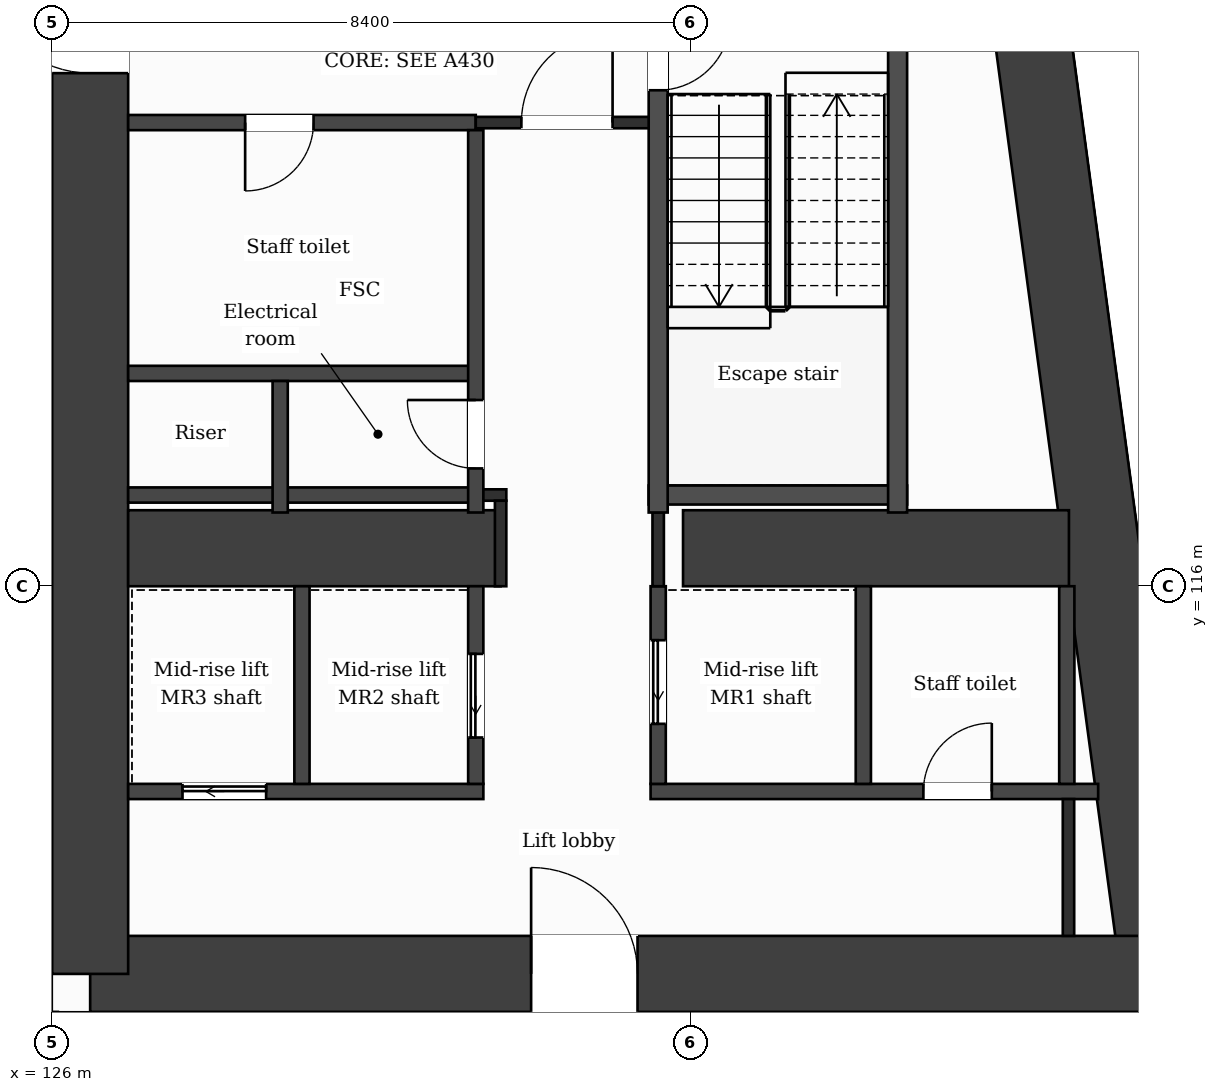
"""IFC4 building model, lengths in metres.
Left out: names, types, materials, properties, quantities, classifications, styles, units other than length and angle.
Written with IfcOpenShell. Run it as: python <this file> out.ifc"""

import sys

from ifc_helpers import new_model, si_unit, direction, frame, frame_2d, origin, place, context, subcontext, project, spatial, rectangle, extrude, element, fill, save


model = new_model("IFC4")
c1 = context("Model", 3, precision=1e-05, world=origin(), true_north=direction((0.0, 1.0)))
c2 = subcontext(c1, "Body", "Model", "MODEL_VIEW")
j1 = project(units=[si_unit("LENGTHUNIT", "METRE"), si_unit("PLANEANGLEUNIT", "RADIAN")], contexts=[c1])
p1 = place(None, origin())
s1 = spatial("IfcSite", under=j1, at=p1, CompositionType="ELEMENT")
p2 = place(p1, origin())
s2 = spatial("IfcBuilding", under=s1, at=p2, CompositionType="ELEMENT")
p3 = place(p2, frame((0.0, 0.0, 124.3)))
s3 = spatial("IfcBuildingStorey", under=s2, at=p3, CompositionType="ELEMENT", Elevation=124.3)
p4 = place(p3, frame((137.732, 131.9, 0.0), z_axis=(0.0, 0.0, 1.0), x_axis=(0.133411141623, -0.991060778808, 0.0)))
e1 = element("IfcWall", 1, at=p4, inside=s3, PredefinedType="SHEAR", context=c2, shape_type="SweptSolid", body=[
    extrude(rectangle(XDim=21.189, YDim=1.0, at=frame_2d((10.595, 0.0))), origin(), (0.0, 0.0, 1.0), 3.7),
])
p5 = place(p3, frame((140.559, 110.9, 0.0), z_axis=(0.0, 0.0, 1.0), x_axis=(-1.0, 0.0, 0.0)))
e2 = element("IfcWall", 2, at=p5, inside=s3, PredefinedType="SHEAR", context=c2, shape_type="SweptSolid", body=[
    extrude(rectangle(XDim=14.059, YDim=1.0, at=frame_2d((7.029, 0.0))), origin(), (0.0, 0.0, 1.0), 3.7),
])
p6 = place(p5, frame((6.858, 0.0, 0.0)))
e3 = element("IfcOpeningElement", 3, at=p6, cuts=e2, PredefinedType="OPENING", context=c2, shape_type="SweptSolid", body=[
    extrude(rectangle(XDim=1.4, YDim=2.1, at=frame_2d((0.7, 1.05))), frame((0.0, 0.51, 0.0), z_axis=(0.0, -1.0, 0.0), x_axis=(1.0, 0.0, 0.0)), (0.0, 0.0, 1.0), 1.02),
])
p7 = place(p3, frame((126.5, 110.9, 0.0), z_axis=(0.0, 0.0, 1.0), x_axis=(0.0, 1.0, 0.0)))
e4 = element("IfcWall", 4, at=p7, inside=s3, PredefinedType="SHEAR", context=c2, shape_type="SweptSolid", body=[
    extrude(rectangle(XDim=21.0, YDim=1.0, at=frame_2d((10.5, 0.0))), origin(), (0.0, 0.0, 1.0), 3.7),
])
p8 = place(p7, frame((11.85, 0.0, 0.0)))
e5 = element("IfcOpeningElement", 5, at=p8, cuts=e4, PredefinedType="OPENING", context=c2, shape_type="SweptSolid", body=[
    extrude(rectangle(XDim=1.4, YDim=2.1, at=frame_2d((0.7, 1.05))), frame((0.0, 0.51, 0.0), z_axis=(0.0, -1.0, 0.0), x_axis=(1.0, 0.0, 0.0)), (0.0, 0.0, 1.0), 1.02),
])
p9 = place(p3, frame((127.0, 116.5, 0.0), z_axis=(0.0, 0.0, 1.0), x_axis=(1.0, 0.0, 0.0)))
e6 = element("IfcWall", 6, at=p9, inside=s3, PredefinedType="SHEAR", context=c2, shape_type="SweptSolid", body=[
    extrude(rectangle(XDim=4.9, YDim=1.0, at=frame_2d((2.45, 0.0))), origin(), (0.0, 0.0, 1.0), 3.7),
])
p10 = place(p3, frame((134.3, 116.5, 0.0), z_axis=(0.0, 0.0, 1.0), x_axis=(1.0, 0.0, 0.0)))
e7 = element("IfcWall", 7, at=p10, inside=s3, PredefinedType="SHEAR", context=c2, shape_type="SweptSolid", body=[
    extrude(rectangle(XDim=5.077, YDim=1.0, at=frame_2d((2.539, 0.0))), origin(), (0.0, 0.0, 1.0), 3.7),
])
p11 = place(p3, frame((140.348, 103.85, 0.0), z_axis=(0.0, 0.0, 1.0), x_axis=(-0.133431549479, 0.991058031401, 0.0)))
e8 = element("IfcWall", 8, at=p11, inside=s3, PredefinedType="SOLIDWALL", context=c2, shape_type="SweptSolid", body=[
    extrude(rectangle(XDim=6.609, YDim=0.3, at=frame_2d((3.304, 0.0))), origin(), (0.0, 0.0, 1.0), 3.38),
])
p12 = place(p11, frame((0.737, 0.0, 0.9)))
e9 = element("IfcOpeningElement", 9, at=p12, cuts=e8, PredefinedType="OPENING", context=c2, shape_type="SweptSolid", body=[
    extrude(rectangle(XDim=1.2, YDim=2.1, at=frame_2d((0.6, 1.05))), frame((0.0, 0.16, 0.0), z_axis=(0.0, -1.0, 0.0), x_axis=(1.0, 0.0, 0.0)), (0.0, 0.0, 1.0), 0.32),
])
p13 = place(p11, frame((3.991, 0.0, 0.0)))
e10 = element("IfcOpeningElement", 10, at=p13, cuts=e8, PredefinedType="OPENING", context=c2, shape_type="SweptSolid", body=[
    extrude(rectangle(XDim=1.2, YDim=2.4, at=frame_2d((0.6, 1.2))), frame((0.0, 0.16, 0.0), z_axis=(0.0, -1.0, 0.0), x_axis=(1.0, 0.0, 0.0)), (0.0, 0.0, 1.0), 0.32),
])
p14 = place(p3, frame((127.0, 113.3, 0.0), z_axis=(0.0, 0.0, 1.0), x_axis=(1.0, 0.0, 0.0)))
e11 = element("IfcWall", 11, at=p14, inside=s3, PredefinedType="PARTITIONING", context=c2, shape_type="SweptSolid", body=[
    extrude(rectangle(XDim=4.673, YDim=0.2, at=frame_2d((2.336, 0.0))), origin(), (0.0, 0.0, 1.0), 3.38),
])
p15 = place(p14, frame((0.715, 0.0, 0.0)))
e12 = element("IfcOpeningElement", 12, at=p15, cuts=e11, PredefinedType="OPENING", context=c2, shape_type="SweptSolid", body=[
    extrude(rectangle(XDim=1.1, YDim=2.1, at=frame_2d((0.55, 1.05))), frame((0.0, 0.11, 0.0), z_axis=(0.0, -1.0, 0.0), x_axis=(1.0, 0.0, 0.0)), (0.0, 0.0, 1.0), 0.22),
])
p16 = place(p3, frame((133.873, 113.3, 0.0), z_axis=(0.0, 0.0, 1.0), x_axis=(1.0, 0.0, 0.0)))
e13 = element("IfcWall", 13, at=p16, inside=s3, PredefinedType="PARTITIONING", context=c2, shape_type="SweptSolid", body=[
    extrude(rectangle(XDim=5.888, YDim=0.2, at=frame_2d((2.944, 0.0))), origin(), (0.0, 0.0, 1.0), 3.38),
])
p17 = place(p16, frame((3.589, 0.0, 0.0)))
e14 = element("IfcOpeningElement", 14, at=p17, cuts=e13, PredefinedType="OPENING", context=c2, shape_type="SweptSolid", body=[
    extrude(rectangle(XDim=0.9, YDim=2.1, at=frame_2d((0.45, 1.05))), frame((0.0, 0.11, 0.0), z_axis=(0.0, -1.0, 0.0), x_axis=(1.0, 0.0, 0.0)), (0.0, 0.0, 1.0), 0.22),
])
p18 = place(p3, frame((127.0, 117.2, 0.0), z_axis=(0.0, 0.0, 1.0), x_axis=(1.0, 0.0, 0.0)))
e15 = element("IfcWall", 15, at=p18, inside=s3, PredefinedType="PARTITIONING", context=c2, shape_type="SweptSolid", body=[
    extrude(rectangle(XDim=4.573, YDim=0.2, at=frame_2d((2.287, 0.0))), origin(), (0.0, 0.0, 1.0), 3.38),
])
p19 = place(p3, frame((131.573, 117.2, 0.0), z_axis=(0.0, 0.0, 1.0), x_axis=(1.0, 0.0, 0.0)))
e16 = element("IfcWall", 16, at=p19, inside=s3, PredefinedType="PARTITIONING", context=c2, shape_type="SweptSolid", body=[
    extrude(rectangle(XDim=0.402, YDim=0.15, at=frame_2d((0.201, 0.0))), origin(), (0.0, 0.0, 1.0), 3.38),
])
p20 = place(p3, frame((133.848, 117.2, 0.0), z_axis=(0.0, 0.0, 1.0), x_axis=(1.0, 0.0, 0.0)))
e17 = element("IfcWall", 17, at=p20, inside=s3, PredefinedType="PARTITIONING", context=c2, shape_type="SweptSolid", body=[
    extrude(rectangle(XDim=3.4, YDim=0.25, at=frame_2d((1.7, 0.0))), origin(), (0.0, 0.0, 1.0), 3.38),
])
p21 = place(p3, frame((127.0, 118.8, 0.0), z_axis=(0.0, 0.0, 1.0), x_axis=(1.0, 0.0, 0.0)))
e18 = element("IfcWall", 18, at=p21, inside=s3, PredefinedType="PARTITIONING", context=c2, shape_type="SweptSolid", body=[
    extrude(rectangle(XDim=4.573, YDim=0.2, at=frame_2d((2.287, 0.0))), origin(), (0.0, 0.0, 1.0), 3.38),
])
p22 = place(p3, frame((127.0, 122.1, 0.0), z_axis=(0.0, 0.0, 1.0), x_axis=(1.0, 0.0, 0.0)))
e19 = element("IfcWall", 19, at=p22, inside=s3, PredefinedType="PARTITIONING", context=c2, shape_type="SweptSolid", body=[
    extrude(rectangle(XDim=4.573, YDim=0.2, at=frame_2d((2.287, 0.0))), origin(), (0.0, 0.0, 1.0), 3.38),
])
p23 = place(p22, frame((1.539, 0.0, 0.0)))
e20 = element("IfcOpeningElement", 20, at=p23, cuts=e19, PredefinedType="OPENING", context=c2, shape_type="SweptSolid", body=[
    extrude(rectangle(XDim=0.9, YDim=2.1, at=frame_2d((0.45, 1.05))), frame((0.0, 0.11, 0.0), z_axis=(0.0, -1.0, 0.0), x_axis=(1.0, 0.0, 0.0)), (0.0, 0.0, 1.0), 0.22),
])
p24 = place(p3, frame((131.573, 122.1, 0.0), z_axis=(0.0, 0.0, 1.0), x_axis=(1.0, 0.0, 0.0)))
e21 = element("IfcWall", 21, at=p24, inside=s3, PredefinedType="PARTITIONING", context=c2, shape_type="SweptSolid", body=[
    extrude(rectangle(XDim=2.4, YDim=0.15, at=frame_2d((1.2, 0.0))), origin(), (0.0, 0.0, 1.0), 3.38),
])
p25 = place(p24, frame((0.6, 0.0, 0.0)))
e22 = element("IfcOpeningElement", 22, at=p25, cuts=e21, PredefinedType="OPENING", context=c2, shape_type="SweptSolid", body=[
    extrude(rectangle(XDim=1.2, YDim=2.1, at=frame_2d((0.6, 1.05))), frame((0.0, 0.085, 0.0), z_axis=(0.0, -1.0, 0.0), x_axis=(1.0, 0.0, 0.0)), (0.0, 0.0, 1.0), 0.17),
])
p26 = place(p3, frame((100.8, 122.45, 0.0), z_axis=(0.0, 0.0, 1.0), x_axis=(1.0, 0.0, 0.0)))
e23 = element("IfcWall", 23, at=p26, inside=s3, PredefinedType="PARTITIONING", context=c2, shape_type="SweptSolid", body=[
    extrude(rectangle(XDim=25.2, YDim=0.15, at=frame_2d((12.6, 0.0))), origin(), (0.0, 0.0, 1.0), 3.38),
])
p27 = place(p3, frame((126.0, 109.075, 0.0), z_axis=(0.0, 0.0, 1.0), x_axis=(0.0, 1.0, 0.0)))
e24 = element("IfcWall", 24, at=p27, inside=s3, PredefinedType="PARTITIONING", context=c2, shape_type="SweptSolid", body=[
    extrude(rectangle(XDim=1.325, YDim=0.15, at=frame_2d((0.663, 0.0))), origin(), (0.0, 0.0, 1.0), 3.38),
])
p28 = place(p3, frame((129.0, 116.97, 0.0), z_axis=(0.0, 0.0, 1.0), x_axis=(0.0, 1.0, 0.0)))
e25 = element("IfcWall", 25, at=p28, inside=s3, PredefinedType="PARTITIONING", context=c2, shape_type="SweptSolid", body=[
    extrude(rectangle(XDim=1.73, YDim=0.2, at=frame_2d((0.865, 0.0))), origin(), (0.0, 0.0, 1.0), 3.38),
])
p29 = place(p3, frame((129.287, 113.4, 0.0), z_axis=(0.0, 0.0, 1.0), x_axis=(0.0, 1.0, 0.0)))
e26 = element("IfcWall", 26, at=p29, inside=s3, PredefinedType="PARTITIONING", context=c2, shape_type="SweptSolid", body=[
    extrude(rectangle(XDim=2.6, YDim=0.2, at=frame_2d((1.3, 0.0))), origin(), (0.0, 0.0, 1.0), 3.38),
])
p30 = place(p3, frame((131.573, 113.4, 0.0), z_axis=(0.0, 0.0, 1.0), x_axis=(0.0, 1.0, 0.0)))
e27 = element("IfcWall", 27, at=p30, inside=s3, PredefinedType="PARTITIONING", context=c2, shape_type="SweptSolid", body=[
    extrude(rectangle(XDim=2.6, YDim=0.2, at=frame_2d((1.3, 0.0))), origin(), (0.0, 0.0, 1.0), 3.38),
])
p31 = place(p30, frame((0.61, 0.0, 0.0)))
e28 = element("IfcOpeningElement", 28, at=p31, cuts=e27, PredefinedType="OPENING", context=c2, shape_type="SweptSolid", body=[
    extrude(rectangle(XDim=1.1, YDim=2.1, at=frame_2d((0.55, 1.05))), frame((0.0, 0.11, 0.0), z_axis=(0.0, -1.0, 0.0), x_axis=(1.0, 0.0, 0.0)), (0.0, 0.0, 1.0), 0.22),
])
p32 = place(p3, frame((131.573, 116.97, 0.0), z_axis=(0.0, 0.0, 1.0), x_axis=(0.0, 1.0, 0.0)))
e29 = element("IfcWall", 29, at=p32, inside=s3, PredefinedType="PARTITIONING", context=c2, shape_type="SweptSolid", body=[
    extrude(rectangle(XDim=5.03, YDim=0.2, at=frame_2d((2.515, 0.0))), origin(), (0.0, 0.0, 1.0), 3.38),
])
p33 = place(p32, frame((0.58, 0.0, 0.0)))
e30 = element("IfcOpeningElement", 30, at=p33, cuts=e29, PredefinedType="OPENING", context=c2, shape_type="SweptSolid", body=[
    extrude(rectangle(XDim=0.9, YDim=2.1, at=frame_2d((0.45, 1.05))), frame((0.0, 0.11, 0.0), z_axis=(0.0, -1.0, 0.0), x_axis=(1.0, 0.0, 0.0)), (0.0, 0.0, 1.0), 0.22),
])
p34 = place(p3, frame((131.9, 116.0, 0.0), z_axis=(0.0, 0.0, 1.0), x_axis=(0.0, 1.0, 0.0)))
e31 = element("IfcWall", 31, at=p34, inside=s3, PredefinedType="PARTITIONING", context=c2, shape_type="SweptSolid", body=[
    extrude(rectangle(XDim=1.125, YDim=0.15, at=frame_2d((0.562, 0.0))), origin(), (0.0, 0.0, 1.0), 3.38),
])
p35 = place(p3, frame((133.973, 113.4, 0.0), z_axis=(0.0, 0.0, 1.0), x_axis=(0.0, 1.0, 0.0)))
e32 = element("IfcWall", 32, at=p35, inside=s3, PredefinedType="PARTITIONING", context=c2, shape_type="SweptSolid", body=[
    extrude(rectangle(XDim=2.6, YDim=0.2, at=frame_2d((1.3, 0.0))), origin(), (0.0, 0.0, 1.0), 3.38),
])
p36 = place(p35, frame((0.79, 0.0, 0.0)))
e33 = element("IfcOpeningElement", 33, at=p36, cuts=e32, PredefinedType="OPENING", context=c2, shape_type="SweptSolid", body=[
    extrude(rectangle(XDim=1.1, YDim=2.1, at=frame_2d((0.55, 1.05))), frame((0.0, 0.11, 0.0), z_axis=(0.0, -1.0, 0.0), x_axis=(1.0, 0.0, 0.0)), (0.0, 0.0, 1.0), 0.22),
])
p37 = place(p3, frame((133.973, 116.0, 0.0), z_axis=(0.0, 0.0, 1.0), x_axis=(0.0, 1.0, 0.0)))
e34 = element("IfcWall", 34, at=p37, inside=s3, PredefinedType="PARTITIONING", context=c2, shape_type="SweptSolid", body=[
    extrude(rectangle(XDim=0.97, YDim=0.15, at=frame_2d((0.485, 0.0))), origin(), (0.0, 0.0, 1.0), 3.38),
])
p38 = place(p3, frame((133.973, 116.97, 0.0), z_axis=(0.0, 0.0, 1.0), x_axis=(0.0, 1.0, 0.0)))
e35 = element("IfcWall", 35, at=p38, inside=s3, PredefinedType="PARTITIONING", context=c2, shape_type="SweptSolid", body=[
    extrude(rectangle(XDim=6.855, YDim=0.25, at=frame_2d((3.427, 0.0))), origin(), (0.0, 0.0, 1.0), 3.38),
])
p39 = place(p38, frame((5.555, 0.0, 0.0)))
e36 = element("IfcOpeningElement", 36, at=p39, cuts=e35, PredefinedType="OPENING", context=c2, shape_type="SweptSolid", body=[
    extrude(rectangle(XDim=0.95, YDim=2.1, at=frame_2d((0.475, 1.05))), frame((0.0, 0.135, 0.0), z_axis=(0.0, -1.0, 0.0), x_axis=(1.0, 0.0, 0.0)), (0.0, 0.0, 1.0), 0.27),
])
p40 = place(p3, frame((136.672, 113.4, 0.0), z_axis=(0.0, 0.0, 1.0), x_axis=(0.0, 1.0, 0.0)))
e37 = element("IfcWall", 37, at=p40, inside=s3, PredefinedType="PARTITIONING", context=c2, shape_type="SweptSolid", body=[
    extrude(rectangle(XDim=2.6, YDim=0.2, at=frame_2d((1.3, 0.0))), origin(), (0.0, 0.0, 1.0), 3.38),
])
p41 = place(p3, frame((137.123, 116.97, 0.0), z_axis=(0.0, 0.0, 1.0), x_axis=(0.0, 1.0, 0.0)))
e38 = element("IfcWall", 38, at=p41, inside=s3, PredefinedType="PARTITIONING", context=c2, shape_type="SweptSolid", body=[
    extrude(rectangle(XDim=6.855, YDim=0.25, at=frame_2d((3.427, 0.0))), origin(), (0.0, 0.0, 1.0), 3.38),
])
p42 = place(p3, frame((139.349, 113.4, 0.0), z_axis=(0.0, 0.0, 1.0), x_axis=(0.0, 1.0, 0.0)))
e39 = element("IfcWall", 39, at=p42, inside=s3, PredefinedType="PARTITIONING", context=c2, shape_type="SweptSolid", body=[
    extrude(rectangle(XDim=2.6, YDim=0.2, at=frame_2d((1.3, 0.0))), origin(), (0.0, 0.0, 1.0), 3.38),
])
p43 = place(p3, frame((139.371, 111.4, 0.0), z_axis=(0.0, 0.0, 1.0), x_axis=(0.0, 1.0, 0.0)))
e40 = element("IfcWall", 40, at=p43, inside=s3, PredefinedType="PARTITIONING", context=c2, shape_type="SweptSolid", body=[
    extrude(rectangle(XDim=1.8, YDim=0.15, at=frame_2d((0.9, 0.0))), origin(), (0.0, 0.0, 1.0), 3.38),
])
p44 = place(p25, origin())
e41 = element("IfcDoor", 41, at=p44, inside=s3, OperationType="SINGLE_SWING_RIGHT", PredefinedType="DOOR", context=c2, shape_type="SweptSolid", body=[
    extrude(rectangle(XDim=1.2, YDim=2.1, at=frame_2d((0.6, 1.05))), frame((0.0, 0.025, 0.0), z_axis=(0.0, -1.0, 0.0), x_axis=(1.0, 0.0, 0.0)), (0.0, 0.0, 1.0), 0.05),
])
fill(e22, e41)
p45 = place(p23, origin())
e42 = element("IfcDoor", 42, at=p45, inside=s3, OperationType="SINGLE_SWING_LEFT", PredefinedType="DOOR", context=c2, shape_type="SweptSolid", body=[
    extrude(rectangle(XDim=0.9, YDim=2.1, at=frame_2d((0.45, 1.05))), frame((0.0, 0.025, 0.0), z_axis=(0.0, -1.0, 0.0), x_axis=(1.0, 0.0, 0.0)), (0.0, 0.0, 1.0), 0.05),
])
fill(e20, e42)
p46 = place(p39, origin())
e43 = element("IfcDoor", 43, at=p46, inside=s3, OperationType="SINGLE_SWING_RIGHT", PredefinedType="DOOR", context=c2, shape_type="SweptSolid", body=[
    extrude(rectangle(XDim=0.95, YDim=2.1, at=frame_2d((0.475, 1.05))), frame((0.0, 0.025, 0.0), z_axis=(0.0, -1.0, 0.0), x_axis=(1.0, 0.0, 0.0)), (0.0, 0.0, 1.0), 0.05),
])
fill(e36, e43)
p47 = place(p33, origin())
e44 = element("IfcDoor", 44, at=p47, inside=s3, OperationType="SINGLE_SWING_RIGHT", PredefinedType="DOOR", context=c2, shape_type="SweptSolid", body=[
    extrude(rectangle(XDim=0.9, YDim=2.1, at=frame_2d((0.45, 1.05))), frame((0.0, 0.025, 0.0), z_axis=(0.0, -1.0, 0.0), x_axis=(1.0, 0.0, 0.0)), (0.0, 0.0, 1.0), 0.05),
])
fill(e30, e44)
p48 = place(p36, origin())
e45 = element("IfcDoor", 45, at=p48, inside=s3, OperationType="SLIDING_TO_LEFT", PredefinedType="DOOR", context=c2, shape_type="SweptSolid", body=[
    extrude(rectangle(XDim=1.1, YDim=2.1, at=frame_2d((0.55, 1.05))), frame((0.0, 0.025, 0.0), z_axis=(0.0, -1.0, 0.0), x_axis=(1.0, 0.0, 0.0)), (0.0, 0.0, 1.0), 0.05),
])
fill(e33, e45)
p49 = place(p31, origin())
e46 = element("IfcDoor", 46, at=p49, inside=s3, OperationType="SLIDING_TO_LEFT", PredefinedType="DOOR", context=c2, shape_type="SweptSolid", body=[
    extrude(rectangle(XDim=1.1, YDim=2.1, at=frame_2d((0.55, 1.05))), frame((0.0, 0.025, 0.0), z_axis=(0.0, -1.0, 0.0), x_axis=(1.0, 0.0, 0.0)), (0.0, 0.0, 1.0), 0.05),
])
fill(e28, e46)
p50 = place(p15, origin())
e47 = element("IfcDoor", 47, at=p50, inside=s3, OperationType="SLIDING_TO_LEFT", PredefinedType="DOOR", context=c2, shape_type="SweptSolid", body=[
    extrude(rectangle(XDim=1.1, YDim=2.1, at=frame_2d((0.55, 1.05))), frame((0.0, 0.025, 0.0), z_axis=(0.0, -1.0, 0.0), x_axis=(1.0, 0.0, 0.0)), (0.0, 0.0, 1.0), 0.05),
])
fill(e12, e47)
p51 = place(p17, origin())
e48 = element("IfcDoor", 48, at=p51, inside=s3, OperationType="SINGLE_SWING_RIGHT", PredefinedType="DOOR", context=c2, shape_type="SweptSolid", body=[
    extrude(rectangle(XDim=0.9, YDim=2.1, at=frame_2d((0.45, 1.05))), frame((0.0, 0.025, 0.0), z_axis=(0.0, -1.0, 0.0), x_axis=(1.0, 0.0, 0.0)), (0.0, 0.0, 1.0), 0.05),
])
fill(e14, e48)
p52 = place(p6, origin())
e49 = element("IfcDoor", 49, at=p52, inside=s3, OperationType="SINGLE_SWING_RIGHT", PredefinedType="DOOR", context=c2, shape_type="SweptSolid", body=[
    extrude(rectangle(XDim=1.4, YDim=2.1, at=frame_2d((0.7, 1.05))), frame((0.0, 0.025, 0.0), z_axis=(0.0, -1.0, 0.0), x_axis=(1.0, 0.0, 0.0)), (0.0, 0.0, 1.0), 0.05),
])
fill(e3, e49)
p53 = place(p8, origin())
e50 = element("IfcDoor", 50, at=p53, inside=s3, OperationType="SINGLE_SWING_RIGHT", PredefinedType="DOOR", context=c2, shape_type="SweptSolid", body=[
    extrude(rectangle(XDim=1.4, YDim=2.1, at=frame_2d((0.7, 1.05))), frame((0.0, 0.025, 0.0), z_axis=(0.0, -1.0, 0.0), x_axis=(1.0, 0.0, 0.0)), (0.0, 0.0, 1.0), 0.05),
])
fill(e5, e50)
save(model, sys.argv[1])
